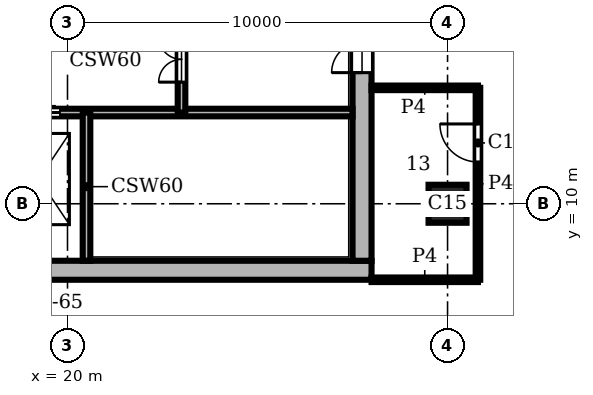
"""IFC4 building model, lengths in metres.
Left out: names, types, materials, properties, quantities, classifications, styles, units other than length and angle.
Written with IfcOpenShell. Run it as: python <this file> out.ifc"""

import sys

from ifc_helpers import new_model, si_unit, direction, frame, frame_2d, origin, origin_2d, place, context, subcontext, project, spatial, rectangle, extrude, element, fill, save


model = new_model("IFC4")
c1 = context("Model", 3, precision=1e-05, world=origin(), true_north=direction((0.0, 1.0)))
c2 = subcontext(c1, "Body", "Model", "MODEL_VIEW")
j1 = project(units=[si_unit("LENGTHUNIT", "METRE"), si_unit("PLANEANGLEUNIT", "RADIAN")], contexts=[c1])
p1 = place(None, origin())
s1 = spatial("IfcSite", under=j1, at=p1, CompositionType="ELEMENT")
p2 = place(p1, origin())
s2 = spatial("IfcBuilding", under=s1, at=p2, CompositionType="ELEMENT")
p3 = place(p2, frame((0.0, 0.0, 341.1)))
s3 = spatial("IfcBuildingStorey", under=s2, at=p3, CompositionType="ELEMENT", Elevation=341.1)
p4 = place(p3, frame((30.0, 10.0, 0.0), z_axis=(0.0, 0.0, 1.0), x_axis=(1.0, 0.0, 0.0)))
e1 = element("IfcColumn", 1, at=p4, inside=s3, PredefinedType="COLUMN", context=c2, shape_type="SweptSolid", body=[
    extrude(rectangle(XDim=1.0, YDim=1.0, at=origin_2d()), origin(), (0.0, 0.0, 1.0), 3.9),
])
p5 = place(p3, frame((8.0, 8.25, 0.0), z_axis=(0.0, 0.0, 1.0), x_axis=(1.0, 0.0, 0.0)))
e2 = element("IfcWall", 2, at=p5, inside=s3, PredefinedType="SHEAR", context=c2, shape_type="SweptSolid", body=[
    extrude(rectangle(XDim=20.0, YDim=0.5, at=frame_2d((10.0, 0.0))), origin(), (0.0, 0.0, 1.0), 3.9),
])
p6 = place(p3, frame((27.75, 8.5, 0.0), z_axis=(0.0, 0.0, 1.0), x_axis=(0.0, 1.0, 0.0)))
e3 = element("IfcWall", 3, at=p6, inside=s3, PredefinedType="SHEAR", context=c2, shape_type="SweptSolid", body=[
    extrude(rectangle(XDim=19.0, YDim=0.5, at=frame_2d((9.5, 0.0))), origin(), (0.0, 0.0, 1.0), 3.9),
])
p7 = place(p6, frame((4.95, 0.0, 0.0)))
e4 = element("IfcOpeningElement", 4, at=p7, cuts=e3, PredefinedType="OPENING", context=c2, shape_type="SweptSolid", body=[
    extrude(rectangle(XDim=1.6, YDim=2.1, at=frame_2d((0.8, 1.05))), frame((0.0, 0.26, 0.0), z_axis=(0.0, -1.0, 0.0), x_axis=(1.0, 0.0, 0.0)), (0.0, 0.0, 1.0), 0.52),
])
p8 = place(p3, frame((13.8, 12.4, 0.0), z_axis=(0.0, 0.0, 1.0), x_axis=(1.0, 0.0, 0.0)))
e5 = element("IfcWall", 5, at=p8, inside=s3, PredefinedType="SHEAR", context=c2, shape_type="SweptSolid", body=[
    extrude(rectangle(XDim=13.7, YDim=0.2, at=frame_2d((6.85, 0.0))), origin(), (0.0, 0.0, 1.0), 3.58),
])
p9 = place(p8, frame((2.4, 0.0, 0.0)))
e6 = element("IfcOpeningElement", 6, at=p9, cuts=e5, PredefinedType="OPENING", context=c2, shape_type="SweptSolid", body=[
    extrude(rectangle(XDim=1.1, YDim=2.1, at=frame_2d((0.55, 1.05))), frame((0.0, 0.11, 0.0), z_axis=(0.0, -1.0, 0.0), x_axis=(1.0, 0.0, 0.0)), (0.0, 0.0, 1.0), 0.22),
])
p10 = place(p8, frame((4.9, 0.0, 0.0)))
e7 = element("IfcOpeningElement", 7, at=p10, cuts=e5, PredefinedType="OPENING", context=c2, shape_type="SweptSolid", body=[
    extrude(rectangle(XDim=1.1, YDim=2.1, at=frame_2d((0.55, 1.05))), frame((0.0, 0.11, 0.0), z_axis=(0.0, -1.0, 0.0), x_axis=(1.0, 0.0, 0.0)), (0.0, 0.0, 1.0), 0.22),
])
p11 = place(p8, frame((0.15, 0.0, 0.0)))
e8 = element("IfcOpeningElement", 8, at=p11, cuts=e5, PredefinedType="OPENING", context=c2, shape_type="SweptSolid", body=[
    extrude(rectangle(XDim=1.0, YDim=2.1, at=frame_2d((0.5, 1.05))), frame((0.0, 0.11, 0.0), z_axis=(0.0, -1.0, 0.0), x_axis=(1.0, 0.0, 0.0)), (0.0, 0.0, 1.0), 0.22),
])
p12 = place(p3, frame((20.5, 8.5, 0.0), z_axis=(0.0, 0.0, 1.0), x_axis=(0.0, 1.0, 0.0)))
e9 = element("IfcWall", 9, at=p12, inside=s3, PredefinedType="SHEAR", context=c2, shape_type="SweptSolid", body=[
    extrude(rectangle(XDim=3.9, YDim=0.2, at=frame_2d((1.95, 0.0))), origin(), (0.0, 0.0, 1.0), 3.58),
])
p13 = place(p3, frame((23.0, 12.4, 0.0), z_axis=(0.0, 0.0, 1.0), x_axis=(0.0, 1.0, 0.0)))
e10 = element("IfcWall", 10, at=p13, inside=s3, PredefinedType="SHEAR", context=c2, shape_type="SweptSolid", body=[
    extrude(rectangle(XDim=2.8, YDim=0.2, at=frame_2d((1.4, 0.0))), origin(), (0.0, 0.0, 1.0), 3.58),
])
p14 = place(p13, frame((0.8, 0.0, 0.0)))
e11 = element("IfcOpeningElement", 11, at=p14, cuts=e10, PredefinedType="OPENING", context=c2, shape_type="SweptSolid", body=[
    extrude(rectangle(XDim=1.2, YDim=2.1, at=frame_2d((0.6, 1.05))), frame((0.0, 0.11, 0.0), z_axis=(0.0, -1.0, 0.0), x_axis=(1.0, 0.0, 0.0)), (0.0, 0.0, 1.0), 0.22),
])
p15 = place(p3, frame((30.8, 8.0, 0.0), z_axis=(0.0, 0.0, 1.0), x_axis=(0.0, 1.0, 0.0)))
e12 = element("IfcWall", 12, at=p15, inside=s3, PredefinedType="PARTITIONING", context=c2, shape_type="SweptSolid", body=[
    extrude(rectangle(XDim=5.05, YDim=0.12, at=frame_2d((2.525, 0.0))), origin(), (0.0, 0.0, 1.0), 3.58),
])
p16 = place(p15, frame((3.1, 0.0, 0.0)))
e13 = element("IfcOpeningElement", 13, at=p16, cuts=e12, PredefinedType="OPENING", context=c2, shape_type="SweptSolid", body=[
    extrude(rectangle(XDim=1.0, YDim=2.1, at=frame_2d((0.5, 1.05))), frame((0.0, 0.07, 0.0), z_axis=(0.0, -1.0, 0.0), x_axis=(1.0, 0.0, 0.0)), (0.0, 0.0, 1.0), 0.14),
])
for number, where, z_axis, x_axis in (
    (14, (28.0, 8.0, 0.0), (0.0, 0.0, 1.0), (1.0, 0.0, 0.0)),
    (15, (28.0, 13.05, 0.0), (0.0, 0.0, 1.0), (1.0, 0.0, 0.0)),
):
    element("IfcWall", number, at=place(p3, frame(where, z_axis=z_axis, x_axis=x_axis)), inside=s3, PredefinedType="PARTITIONING", context=c2, shape_type="SweptSolid", body=[
        extrude(rectangle(XDim=2.8, YDim=0.12, at=frame_2d((1.4, 0.0))), origin(), (0.0, 0.0, 1.0), 3.58),
    ])
p17 = place(p10, origin())
e16 = element("IfcDoor", 16, at=p17, inside=s3, OperationType="DOUBLE_DOOR_SLIDING", PredefinedType="DOOR", context=c2, shape_type="SweptSolid", body=[
    extrude(rectangle(XDim=1.1, YDim=2.1, at=frame_2d((0.55, 1.05))), frame((0.0, 0.025, 0.0), z_axis=(0.0, -1.0, 0.0), x_axis=(1.0, 0.0, 0.0)), (0.0, 0.0, 1.0), 0.05),
])
fill(e7, e16)
p18 = place(p14, origin())
e17 = element("IfcDoor", 17, at=p18, inside=s3, OperationType="DOUBLE_DOOR_SINGLE_SWING", PredefinedType="DOOR", context=c2, shape_type="SweptSolid", body=[
    extrude(rectangle(XDim=1.2, YDim=2.1, at=frame_2d((0.6, 1.05))), frame((0.0, 0.025, 0.0), z_axis=(0.0, -1.0, 0.0), x_axis=(1.0, 0.0, 0.0)), (0.0, 0.0, 1.0), 0.05),
])
fill(e11, e17)
p19 = place(p7, origin())
e18 = element("IfcDoor", 18, at=p19, inside=s3, OperationType="DOUBLE_DOOR_SINGLE_SWING", PredefinedType="DOOR", context=c2, shape_type="SweptSolid", body=[
    extrude(rectangle(XDim=1.6, YDim=2.1, at=frame_2d((0.8, 1.05))), frame((0.0, 0.025, 0.0), z_axis=(0.0, -1.0, 0.0), x_axis=(1.0, 0.0, 0.0)), (0.0, 0.0, 1.0), 0.05),
])
fill(e4, e18)
p20 = place(p16, origin())
e19 = element("IfcDoor", 19, at=p20, inside=s3, OperationType="SINGLE_SWING_RIGHT", PredefinedType="DOOR", context=c2, shape_type="SweptSolid", body=[
    extrude(rectangle(XDim=1.0, YDim=2.1, at=frame_2d((0.5, 1.05))), frame((0.0, 0.025, 0.0), z_axis=(0.0, -1.0, 0.0), x_axis=(1.0, 0.0, 0.0)), (0.0, 0.0, 1.0), 0.05),
])
fill(e13, e19)
save(model, sys.argv[1])
